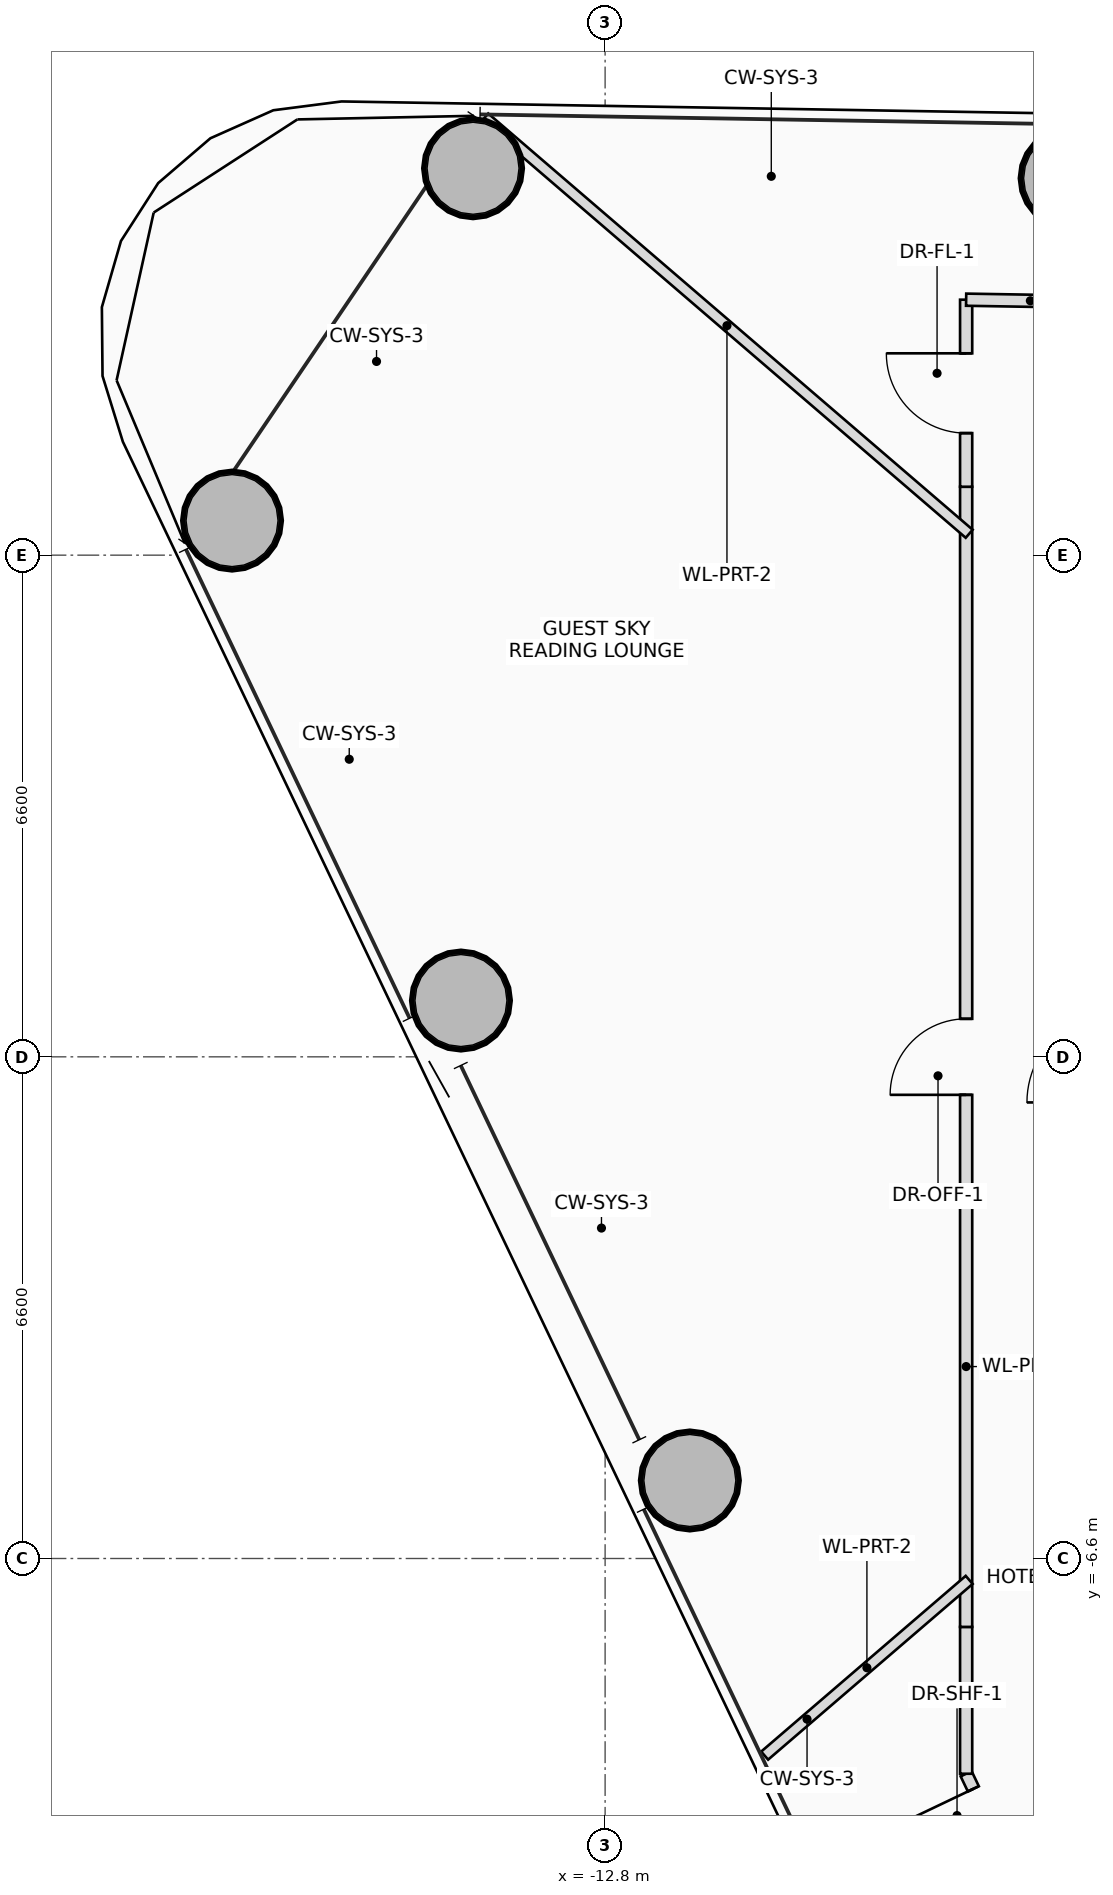
"""IFC4 building model, lengths in metres.
Left out: names, types, materials, properties, quantities, classifications, styles, units other than length and angle.
Written with IfcOpenShell. Run it as: python <this file> out.ifc"""

import sys

from ifc_helpers import new_model, si_unit, direction, frame, frame_2d, origin, origin_2d, place, context, subcontext, project, spatial, rectangle, hollow_circle, extrude, source, transform, mapped, element, fill, save


model = new_model("IFC4")
c1 = context("Model", 3, precision=1e-05, world=origin(), true_north=direction((0.0, 1.0)))
c2 = subcontext(c1, "Body", "Model", "MODEL_VIEW")
j1 = project(units=[si_unit("LENGTHUNIT", "METRE"), si_unit("PLANEANGLEUNIT", "RADIAN")], contexts=[c1])
p1 = place(None, origin())
s1 = spatial("IfcSite", under=j1, at=p1, CompositionType="ELEMENT")
p2 = place(p1, origin())
s2 = spatial("IfcBuilding", under=s1, at=p2, CompositionType="ELEMENT")
p3 = place(p2, frame((0.0, 0.0, 146.75)))
s3 = spatial("IfcBuildingStorey", under=s2, at=p3, CompositionType="ELEMENT", Elevation=146.75)
m1 = source(origin(), c2, "Body", "SweptSolid", [
    extrude(hollow_circle(Radius=0.65, WallThickness=0.045, at=origin_2d()), origin(), (0.0, 0.0, 1.0), 3.45),
])
for number, where, z_axis, x_axis in (
    (1, (-6.688, 11.558, 0.0), (0.0, 0.0, 1.0), (1.0, 0.0, 0.0)),
    (2, (-14.538, 11.69, 0.0), (0.0, 0.0, 1.0), (1.0, 0.0, 0.0)),
    (3, (-17.708, 7.055, 0.0), (0.0, 0.0, 1.0), (1.0, 0.0, 0.0)),
    (4, (-14.697, 0.74, 0.0), (0.0, 0.0, 1.0), (1.0, 0.0, 0.0)),
    (5, (-11.685, -5.573, 0.0), (0.0, 0.0, 1.0), (1.0, 0.0, 0.0)),
):
    element("IfcColumn", number, at=place(p3, frame(where, z_axis=z_axis, x_axis=x_axis)), inside=s3, PredefinedType="COLUMN", context=c2, shape_type="MappedRepresentation", body=[
        mapped(m1, transform((0.0, 0.0, 0.0), scale=1.0)),
    ])
p4 = place(p3, frame((-6.539, -12.6, 0.0), z_axis=(0.0, 0.0, 1.0), x_axis=(-0.430527444218, 0.902577486853, 0.0)))
e6 = element("IfcWall", 6, at=p4, inside=s3, PredefinedType="PARTITIONING", context=c2, shape_type="SweptSolid", body=[
    extrude(rectangle(XDim=3.51, YDim=0.16, at=frame_2d((1.755, 0.0))), origin(), (0.0, 0.0, 1.0), 2.605),
])
p5 = place(p4, frame((2.39, 0.0, 0.0)))
e7 = element("IfcOpeningElement", 7, at=p5, cuts=e6, PredefinedType="OPENING", context=c2, shape_type="SweptSolid", body=[
    extrude(rectangle(XDim=0.9, YDim=2.05, at=frame_2d((0.45, 1.025))), frame((0.0, 0.09, 0.0), z_axis=(0.0, -1.0, 0.0), x_axis=(1.0, 0.0, 0.0)), (0.0, 0.0, 1.0), 0.18),
])
p6 = place(p3, frame((-8.05, -9.432, 0.0), z_axis=(0.0, 0.0, 1.0), x_axis=(0.0, 1.0, 0.0)))
e8 = element("IfcWall", 8, at=p6, inside=s3, PredefinedType="PARTITIONING", context=c2, shape_type="SweptSolid", body=[
    extrude(rectangle(XDim=1.932, YDim=0.16, at=frame_2d((0.966, 0.0))), origin(), (0.0, 0.0, 1.0), 2.805),
])
p7 = place(p3, frame((-8.05, -7.5, 0.0), z_axis=(0.0, 0.0, 1.0), x_axis=(0.0, 1.0, 0.0)))
e9 = element("IfcWall", 9, at=p7, inside=s3, PredefinedType="PARTITIONING", context=c2, shape_type="SweptSolid", body=[
    extrude(rectangle(XDim=15.0, YDim=0.16, at=frame_2d((7.5, 0.0))), origin(), (0.0, 0.0, 1.0), 2.605),
])
p8 = place(p7, frame((7.0, 0.0, 0.0)))
e10 = element("IfcOpeningElement", 10, at=p8, cuts=e9, PredefinedType="OPENING", context=c2, shape_type="SweptSolid", body=[
    extrude(rectangle(XDim=1.0, YDim=2.25, at=frame_2d((0.5, 1.125))), frame((0.0, 0.09, 0.0), z_axis=(0.0, -1.0, 0.0), x_axis=(1.0, 0.0, 0.0)), (0.0, 0.0, 1.0), 0.18),
])
p9 = place(p3, frame((-8.05, 7.5, 0.0), z_axis=(0.0, 0.0, 1.0), x_axis=(0.0, 1.0, 0.0)))
e11 = element("IfcWall", 11, at=p9, inside=s3, PredefinedType="PARTITIONING", context=c2, shape_type="SweptSolid", body=[
    extrude(rectangle(XDim=2.461, YDim=0.16, at=frame_2d((1.23, 0.0))), origin(), (0.0, 0.0, 1.0), 2.805),
])
p10 = place(p9, frame((0.706, 0.0, 0.0)))
e12 = element("IfcOpeningElement", 12, at=p10, cuts=e11, PredefinedType="OPENING", context=c2, shape_type="SweptSolid", body=[
    extrude(rectangle(XDim=1.05, YDim=2.2, at=frame_2d((0.525, 1.1))), frame((0.0, 0.09, 0.0), z_axis=(0.0, -1.0, 0.0), x_axis=(1.0, 0.0, 0.0)), (0.0, 0.0, 1.0), 0.18),
])
p11 = place(p3, frame((-8.05, 9.961, 0.0), z_axis=(0.0, 0.0, 1.0), x_axis=(0.999859611566, -0.016755809729, 0.0)))
e13 = element("IfcWall", 13, at=p11, inside=s3, PredefinedType="PARTITIONING", context=c2, shape_type="SweptSolid", body=[
    extrude(rectangle(XDim=1.69, YDim=0.16, at=frame_2d((0.845, 0.0))), origin(), (0.0, 0.0, 1.0), 2.605),
])
p12 = place(p3, frame((-8.01, 6.882, 0.0), z_axis=(0.0, 0.0, 1.0), x_axis=(-0.758515743862, 0.651654714026, 0.0)))
e14 = element("IfcWall", 14, at=p12, inside=s3, PredefinedType="PARTITIONING", context=c2, shape_type="SweptSolid", body=[
    extrude(rectangle(XDim=8.403, YDim=0.14, at=frame_2d((4.202, 0.0))), origin(), (0.0, 0.0, 1.0), 2.605),
])
p13 = place(p3, frame((-8.01, -6.882, 0.0), z_axis=(0.0, 0.0, 1.0), x_axis=(-0.75852259091, -0.651646744087, 0.0)))
e15 = element("IfcWall", 15, at=p13, inside=s3, PredefinedType="PARTITIONING", context=c2, shape_type="SweptSolid", body=[
    extrude(rectangle(XDim=3.548, YDim=0.14, at=frame_2d((1.774, 0.0))), origin(), (0.0, 0.0, 1.0), 2.765),
])
p14 = place(p5, origin())
e16 = element("IfcDoor", 16, at=p14, inside=s3, OperationType="SINGLE_SWING_RIGHT", PredefinedType="DOOR", context=c2, shape_type="SweptSolid", body=[
    extrude(rectangle(XDim=0.9, YDim=2.05, at=frame_2d((0.45, 1.025))), frame((0.0, 0.025, 0.0), z_axis=(0.0, -1.0, 0.0), x_axis=(1.0, 0.0, 0.0)), (0.0, 0.0, 1.0), 0.05),
])
fill(e7, e16)
p15 = place(p8, origin())
e17 = element("IfcDoor", 17, at=p15, inside=s3, OperationType="SINGLE_SWING_LEFT", PredefinedType="DOOR", context=c2, shape_type="SweptSolid", body=[
    extrude(rectangle(XDim=1.0, YDim=2.25, at=frame_2d((0.5, 1.125))), frame((0.0, 0.025, 0.0), z_axis=(0.0, -1.0, 0.0), x_axis=(1.0, 0.0, 0.0)), (0.0, 0.0, 1.0), 0.05),
])
fill(e10, e17)
p16 = place(p10, origin())
e18 = element("IfcDoor", 18, at=p16, inside=s3, OperationType="SINGLE_SWING_RIGHT", PredefinedType="DOOR", context=c2, shape_type="SweptSolid", body=[
    extrude(rectangle(XDim=1.05, YDim=2.2, at=frame_2d((0.525, 1.1))), frame((0.0, 0.025, 0.0), z_axis=(0.0, -1.0, 0.0), x_axis=(1.0, 0.0, 0.0)), (0.0, 0.0, 1.0), 0.05),
])
fill(e12, e18)
save(model, sys.argv[1])
